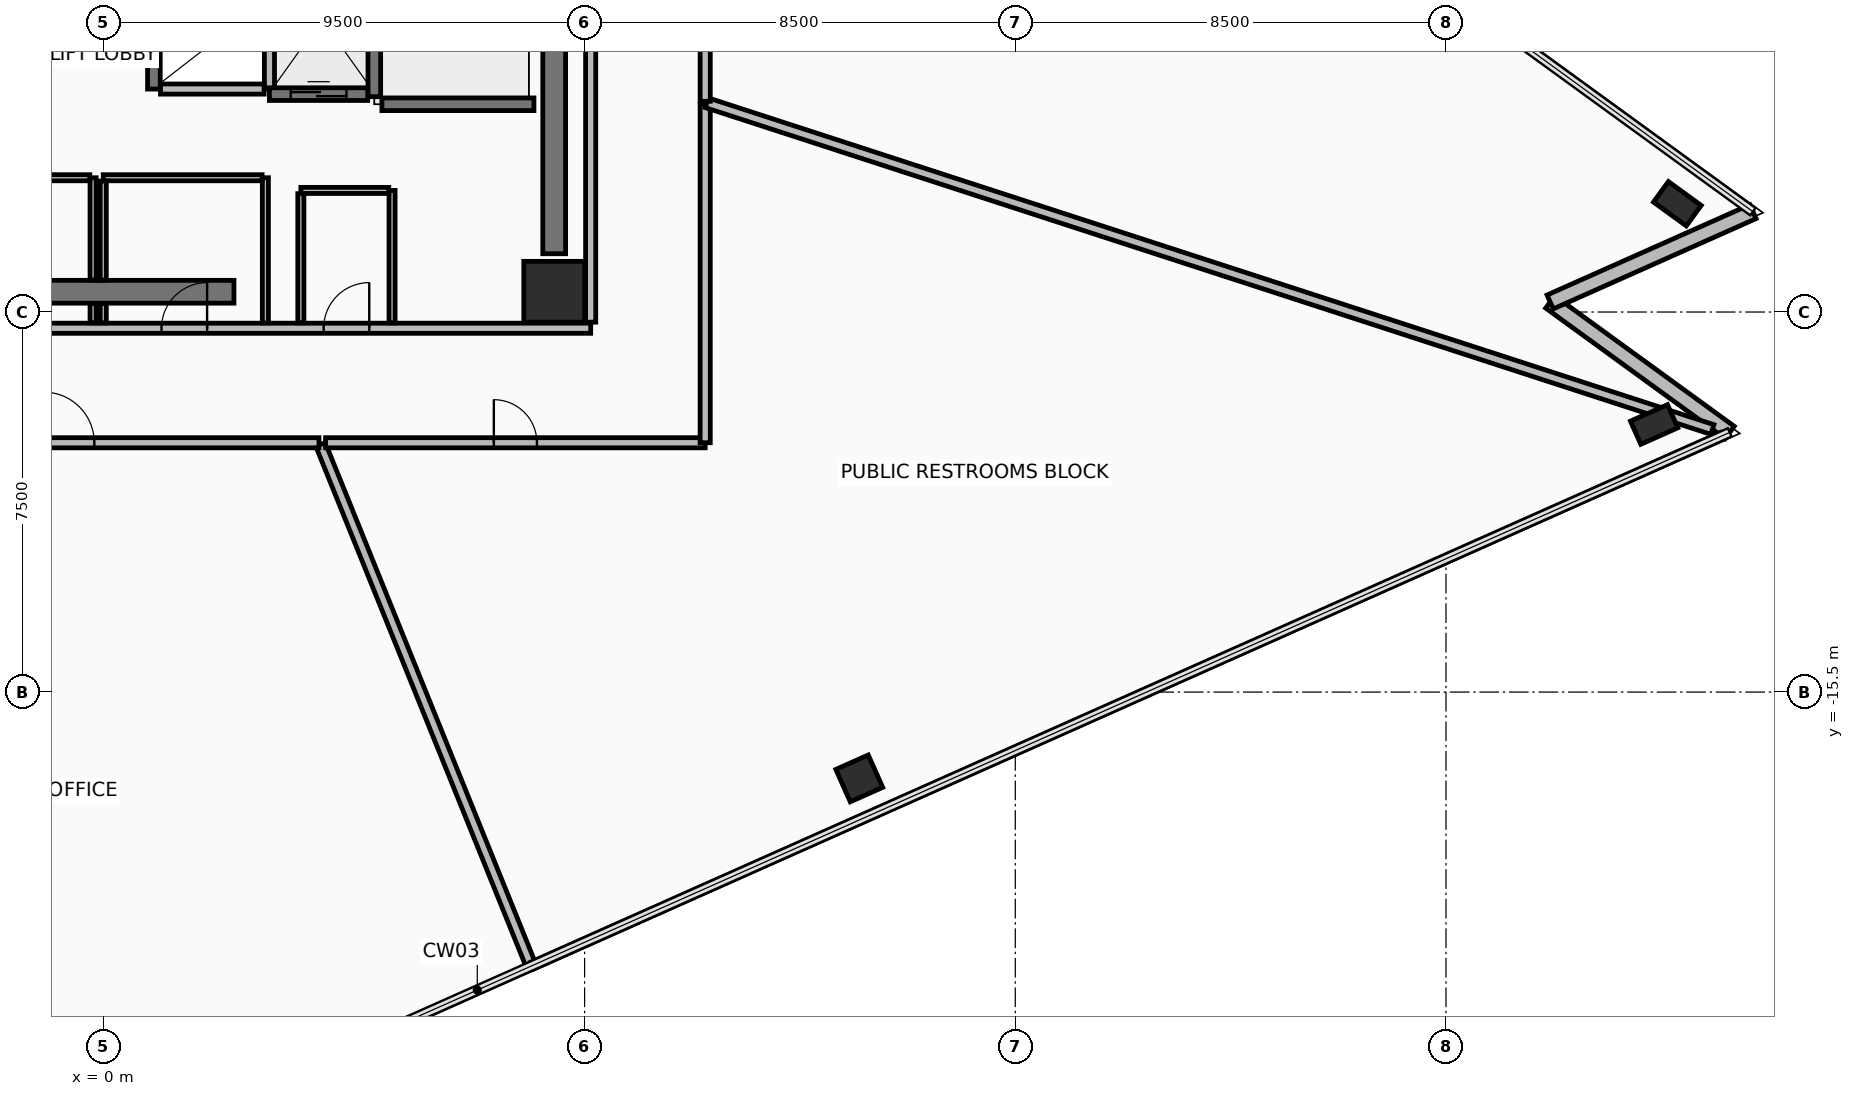
"""IFC4 building model, lengths in metres.
Left out: names, types, materials, properties, quantities, classifications, styles, units other than length and angle.
Written with IfcOpenShell. Run it as: python <this file> out.ifc"""

import sys

from ifc_helpers import new_model, si_unit, direction, frame, frame_2d, origin, origin_2d, place, context, subcontext, project, spatial, rectangle, hollow_rectangle, extrude, element, fill, save


model = new_model("IFC4")
c1 = context("Model", 3, precision=1e-05, world=origin(), true_north=direction((0.0, 1.0)))
c2 = subcontext(c1, "Body", "Model", "MODEL_VIEW")
j1 = project(units=[si_unit("LENGTHUNIT", "METRE"), si_unit("PLANEANGLEUNIT", "RADIAN")], contexts=[c1])
p1 = place(None, origin())
s1 = spatial("IfcSite", under=j1, at=p1, CompositionType="ELEMENT")
p2 = place(p1, origin())
s2 = spatial("IfcBuilding", under=s1, at=p2, CompositionType="ELEMENT")
p3 = place(p2, frame((0.0, 0.0, 112.45)))
s3 = spatial("IfcBuildingStorey", under=s2, at=p3, CompositionType="ELEMENT", Elevation=112.45)
p4 = place(p3, frame((8.9, -7.6, 0.0), z_axis=(0.0, 0.0, 1.0), x_axis=(1.0, 0.0, 0.0)))
e1 = element("IfcColumn", 1, at=p4, inside=s3, PredefinedType="COLUMN", context=c2, shape_type="SweptSolid", body=[
    extrude(rectangle(XDim=1.2, YDim=1.2, at=origin_2d()), origin(), (0.0, 0.0, 1.0), 3.6),
])
p5 = place(p3, frame((14.921, -17.204, 0.0), z_axis=(0.0, 0.0, 1.0), x_axis=(0.913545457643, 0.406736643076, 0.0)))
e2 = element("IfcColumn", 2, at=p5, inside=s3, PredefinedType="COLUMN", context=c2, shape_type="SweptSolid", body=[
    extrude(hollow_rectangle(XDim=0.7, YDim=0.7, WallThickness=0.04, at=origin_2d()), origin(), (0.0, 0.0, 1.0), 3.6),
])
for number, where, z_axis, x_axis in (
    (3, (30.608, -10.219, 0.0), (0.0, 0.0, 1.0), (0.914, 0.407, 0.0)),
    (4, (31.066, -5.863, 0.0), (0.0, 0.0, 1.0), (-0.809, 0.588, 0.0)),
):
    element("IfcColumn", number, at=place(p3, frame(where, z_axis=z_axis, x_axis=x_axis)), inside=s3, PredefinedType="COLUMN", context=c2, shape_type="SweptSolid", body=[
        extrude(hollow_rectangle(XDim=0.5, YDim=0.8, WallThickness=0.04, at=origin_2d()), origin(), (0.0, 0.0, 1.0), 3.6),
    ])
for number, where, z_axis, x_axis in (
    (5, (32.1, -10.376, 0.0), (0.0, 0.0, 1.0), (-0.809, 0.588, 0.0)),
    (6, (28.556, -7.802, 0.0), (0.0, 0.0, 1.0), (0.914, 0.407, 0.0)),
):
    element("IfcWall", number, at=place(p3, frame(where, z_axis=z_axis, x_axis=x_axis)), inside=s3, PredefinedType="STANDARD", context=c2, shape_type="SweptSolid", body=[
        extrude(rectangle(XDim=4.38, YDim=0.3, at=frame_2d((2.19, 0.0))), origin(), (0.0, 0.0, 1.0), 2.705),
    ])
p6 = place(p3, frame((-2.8, -7.6, 0.0), z_axis=(0.0, 0.0, 1.0), x_axis=(1.0, 0.0, 0.0)))
e7 = element("IfcWall", 7, at=p6, inside=s3, PredefinedType="SHEAR", context=c2, shape_type="SweptSolid", body=[
    extrude(rectangle(XDim=5.38, YDim=0.45, at=frame_2d((2.69, 0.0))), origin(), (0.0, 0.0, 1.0), 3.41),
])
p7 = place(p3, frame((8.9, -6.85, 0.0), z_axis=(0.0, 0.0, 1.0), x_axis=(0.0, 1.0, 0.0)))
e8 = element("IfcWall", 8, at=p7, inside=s3, PredefinedType="SHEAR", context=c2, shape_type="SweptSolid", body=[
    extrude(rectangle(XDim=10.7, YDim=0.45, at=frame_2d((5.35, 0.0))), origin(), (0.0, 0.0, 1.0), 3.41),
])
p8 = place(p3, frame((-9.62, -8.32, 0.0), z_axis=(0.0, 0.0, 1.0), x_axis=(1.0, 0.0, 0.0)))
e9 = element("IfcWall", 9, at=p8, inside=s3, PredefinedType="PARTITIONING", context=c2, shape_type="SweptSolid", body=[
    extrude(rectangle(XDim=19.24, YDim=0.2, at=frame_2d((9.62, 0.0))), origin(), (0.0, 0.0, 1.0), 2.855),
])
p9 = place(p8, frame((7.37, 0.0, 0.0)))
e10 = element("IfcOpeningElement", 10, at=p9, cuts=e9, PredefinedType="OPENING", context=c2, shape_type="SweptSolid", body=[
    extrude(rectangle(XDim=0.9, YDim=2.1, at=frame_2d((0.45, 1.05))), frame((0.0, 0.11, 0.0), z_axis=(0.0, -1.0, 0.0), x_axis=(1.0, 0.0, 0.0)), (0.0, 0.0, 1.0), 0.22),
])
p10 = place(p8, frame((10.77, 0.0, 0.0)))
e11 = element("IfcOpeningElement", 11, at=p10, cuts=e9, PredefinedType="OPENING", context=c2, shape_type="SweptSolid", body=[
    extrude(rectangle(XDim=0.9, YDim=2.1, at=frame_2d((0.45, 1.05))), frame((0.0, 0.11, 0.0), z_axis=(0.0, -1.0, 0.0), x_axis=(1.0, 0.0, 0.0)), (0.0, 0.0, 1.0), 0.22),
])
p11 = place(p8, frame((13.97, 0.0, 0.0)))
e12 = element("IfcOpeningElement", 12, at=p11, cuts=e9, PredefinedType="OPENING", context=c2, shape_type="SweptSolid", body=[
    extrude(rectangle(XDim=0.9, YDim=2.1, at=frame_2d((0.45, 1.05))), frame((0.0, 0.11, 0.0), z_axis=(0.0, -1.0, 0.0), x_axis=(1.0, 0.0, 0.0)), (0.0, 0.0, 1.0), 0.22),
])
p12 = place(p3, frame((9.62, -8.2, 0.0), z_axis=(0.0, 0.0, 1.0), x_axis=(0.0, 1.0, 0.0)))
e13 = element("IfcWall", 13, at=p12, inside=s3, PredefinedType="PARTITIONING", context=c2, shape_type="SweptSolid", body=[
    extrude(rectangle(XDim=16.4, YDim=0.2, at=frame_2d((8.2, 0.0))), origin(), (0.0, 0.0, 1.0), 2.855),
])
p13 = place(p12, frame((12.65, 0.0, 0.0)))
e14 = element("IfcOpeningElement", 14, at=p13, cuts=e13, PredefinedType="OPENING", context=c2, shape_type="SweptSolid", body=[
    extrude(rectangle(XDim=1.1, YDim=2.15, at=frame_2d((0.55, 1.075))), frame((0.0, 0.11, 0.0), z_axis=(0.0, -1.0, 0.0), x_axis=(1.0, 0.0, 0.0)), (0.0, 0.0, 1.0), 0.22),
])
p14 = place(p3, frame((5.35, -3.75, 0.0), z_axis=(0.0, 0.0, 1.0), x_axis=(0.0, 1.0, 0.0)))
e15 = element("IfcWall", 15, at=p14, inside=s3, PredefinedType="SHEAR", context=c2, shape_type="SweptSolid", body=[
    extrude(rectangle(XDim=7.3, YDim=0.25, at=frame_2d((3.65, 0.0))), origin(), (0.0, 0.0, 1.0), 3.41),
])
p15 = place(p3, frame((5.5, -3.9, 0.0), z_axis=(0.0, 0.0, 1.0), x_axis=(1.0, 0.0, 0.0)))
e16 = element("IfcWall", 16, at=p15, inside=s3, PredefinedType="SHEAR", context=c2, shape_type="SweptSolid", body=[
    extrude(rectangle(XDim=3.0, YDim=0.25, at=frame_2d((1.5, 0.0))), origin(), (0.0, 0.0, 1.0), 3.41),
])
p16 = place(p3, frame((1.0, -3.6, 0.0), z_axis=(0.0, 0.0, 1.0), x_axis=(0.0, 1.0, 0.0)))
e17 = element("IfcWall", 17, at=p16, inside=s3, PredefinedType="SHEAR", context=c2, shape_type="SweptSolid", body=[
    extrude(rectangle(XDim=1.8, YDim=0.25, at=frame_2d((0.9, 0.0))), origin(), (0.0, 0.0, 1.0), 3.41),
])
p17 = place(p3, frame((3.28, -3.6, 0.0), z_axis=(0.0, 0.0, 1.0), x_axis=(0.0, 1.0, 0.0)))
e18 = element("IfcWall", 18, at=p17, inside=s3, PredefinedType="PARTITIONING", context=c2, shape_type="SweptSolid", body=[
    extrude(rectangle(XDim=1.8, YDim=0.2, at=frame_2d((0.9, 0.0))), origin(), (0.0, 0.0, 1.0), 3.41),
])
p18 = place(p3, frame((1.13, -3.6, 0.0), z_axis=(0.0, 0.0, 1.0), x_axis=(1.0, 0.0, 0.0)))
e19 = element("IfcWall", 19, at=p18, inside=s3, PredefinedType="PARTITIONING", context=c2, shape_type="SweptSolid", body=[
    extrude(rectangle(XDim=2.045, YDim=0.2, at=frame_2d((1.022, 0.0))), origin(), (0.0, 0.0, 1.0), 3.41),
])
p19 = place(p3, frame((3.28, -3.7, 0.0), z_axis=(0.0, 0.0, 1.0), x_axis=(1.0, 0.0, 0.0)))
e20 = element("IfcWall", 20, at=p19, inside=s3, PredefinedType="SHEAR", context=c2, shape_type="SweptSolid", body=[
    extrude(rectangle(XDim=1.94, YDim=0.25, at=frame_2d((0.97, 0.0))), origin(), (0.0, 0.0, 1.0), 3.41),
])
p20 = place(p19, frame((0.42, 0.0, 0.0)))
e21 = element("IfcOpeningElement", 21, at=p20, cuts=e20, PredefinedType="OPENING", context=c2, shape_type="SweptSolid", body=[
    extrude(rectangle(XDim=1.1, YDim=2.2, at=frame_2d((0.55, 1.1))), frame((0.0, 0.135, 0.0), z_axis=(0.0, -1.0, 0.0), x_axis=(1.0, 0.0, 0.0)), (0.0, 0.0, 1.0), 0.27),
])
p21 = place(p3, frame((-0.2, -8.215, 0.0), z_axis=(0.0, 0.0, 1.0), x_axis=(0.0, 1.0, 0.0)))
e22 = element("IfcWall", 22, at=p21, inside=s3, PredefinedType="PARTITIONING", context=c2, shape_type="SweptSolid", body=[
    extrude(rectangle(XDim=0.385, YDim=0.12, at=frame_2d((0.192, 0.0))), origin(), (0.0, 0.0, 1.0), 2.605),
])
p22 = place(p3, frame((-0.2, -7.37, 0.0), z_axis=(0.0, 0.0, 1.0), x_axis=(0.0, 1.0, 0.0)))
e23 = element("IfcWall", 23, at=p22, inside=s3, PredefinedType="PARTITIONING", context=c2, shape_type="SweptSolid", body=[
    extrude(rectangle(XDim=2.02, YDim=0.12, at=frame_2d((1.01, 0.0))), origin(), (0.0, 0.0, 1.0), 2.605),
])
p23 = place(p3, frame((-0.265, -5.35, 0.0), z_axis=(0.0, 0.0, 1.0), x_axis=(-1.0, 0.0, 0.0)))
e24 = element("IfcWall", 24, at=p23, inside=s3, PredefinedType="PARTITIONING", context=c2, shape_type="SweptSolid", body=[
    extrude(rectangle(XDim=3.135, YDim=0.12, at=frame_2d((1.567, 0.0))), origin(), (0.0, 0.0, 1.0), 2.605),
])
p24 = place(p3, frame((3.2, -8.215, 0.0), z_axis=(0.0, 0.0, 1.0), x_axis=(0.0, 1.0, 0.0)))
e25 = element("IfcWall", 25, at=p24, inside=s3, PredefinedType="PARTITIONING", context=c2, shape_type="SweptSolid", body=[
    extrude(rectangle(XDim=2.865, YDim=0.12, at=frame_2d((1.433, 0.0))), origin(), (0.0, 0.0, 1.0), 2.605),
])
p25 = place(p3, frame((3.135, -5.35, 0.0), z_axis=(0.0, 0.0, 1.0), x_axis=(-1.0, 0.0, 0.0)))
e26 = element("IfcWall", 26, at=p25, inside=s3, PredefinedType="PARTITIONING", context=c2, shape_type="SweptSolid", body=[
    extrude(rectangle(XDim=3.135, YDim=0.12, at=frame_2d((1.567, 0.0))), origin(), (0.0, 0.0, 1.0), 3.41),
])
p26 = place(p3, frame((0.0, -5.415, 0.0), z_axis=(0.0, 0.0, 1.0), x_axis=(0.0, -1.0, 0.0)))
e27 = element("IfcWall", 27, at=p26, inside=s3, PredefinedType="PARTITIONING", context=c2, shape_type="SweptSolid", body=[
    extrude(rectangle(XDim=1.955, YDim=0.12, at=frame_2d((0.978, 0.0))), origin(), (0.0, 0.0, 1.0), 2.605),
])
p27 = place(p3, frame((0.0, -7.83, 0.0), z_axis=(0.0, 0.0, 1.0), x_axis=(0.0, -1.0, 0.0)))
e28 = element("IfcWall", 28, at=p27, inside=s3, PredefinedType="PARTITIONING", context=c2, shape_type="SweptSolid", body=[
    extrude(rectangle(XDim=0.385, YDim=0.12, at=frame_2d((0.192, 0.0))), origin(), (0.0, 0.0, 1.0), 2.605),
])
p28 = place(p3, frame((5.7, -8.215, 0.0), z_axis=(0.0, 0.0, 1.0), x_axis=(0.0, 1.0, 0.0)))
e29 = element("IfcWall", 29, at=p28, inside=s3, PredefinedType="PARTITIONING", context=c2, shape_type="SweptSolid", body=[
    extrude(rectangle(XDim=2.615, YDim=0.12, at=frame_2d((1.308, 0.0))), origin(), (0.0, 0.0, 1.0), 2.605),
])
p29 = place(p3, frame((5.635, -5.6, 0.0), z_axis=(0.0, 0.0, 1.0), x_axis=(-1.0, 0.0, 0.0)))
e30 = element("IfcWall", 30, at=p29, inside=s3, PredefinedType="PARTITIONING", context=c2, shape_type="SweptSolid", body=[
    extrude(rectangle(XDim=1.735, YDim=0.12, at=frame_2d((0.868, 0.0))), origin(), (0.0, 0.0, 1.0), 3.41),
])
p30 = place(p3, frame((3.9, -5.665, 0.0), z_axis=(0.0, 0.0, 1.0), x_axis=(0.0, -1.0, 0.0)))
e31 = element("IfcWall", 31, at=p30, inside=s3, PredefinedType="PARTITIONING", context=c2, shape_type="SweptSolid", body=[
    extrude(rectangle(XDim=2.55, YDim=0.12, at=frame_2d((1.275, 0.0))), origin(), (0.0, 0.0, 1.0), 2.605),
])
p31 = place(p3, frame((8.437, -20.883, 0.0), z_axis=(0.0, 0.0, 1.0), x_axis=(-0.374607748829, 0.927183387749, 0.0)))
e32 = element("IfcWall", 32, at=p31, inside=s3, PredefinedType="PARTITIONING", context=c2, shape_type="SweptSolid", body=[
    extrude(rectangle(XDim=11.075, YDim=0.2, at=frame_2d((5.537, 0.0))), origin(), (0.0, 0.0, 1.0), 2.705),
])
p32 = place(p3, frame((4.388, -10.58, 0.0), z_axis=(0.0, 0.0, 1.0), x_axis=(1.0, 0.0, 0.0)))
e33 = element("IfcWall", 33, at=p32, inside=s3, PredefinedType="PARTITIONING", context=c2, shape_type="SweptSolid", body=[
    extrude(rectangle(XDim=7.492, YDim=0.2, at=frame_2d((3.746, 0.0))), origin(), (0.0, 0.0, 1.0), 2.855),
])
p33 = place(p32, frame((3.321, 0.0, 0.0)))
e34 = element("IfcOpeningElement", 34, at=p33, cuts=e33, PredefinedType="OPENING", context=c2, shape_type="SweptSolid", body=[
    extrude(rectangle(XDim=0.85, YDim=2.1, at=frame_2d((0.425, 1.05))), frame((0.0, 0.11, 0.0), z_axis=(0.0, -1.0, 0.0), x_axis=(1.0, 0.0, 0.0)), (0.0, 0.0, 1.0), 0.22),
])
p34 = place(p3, frame((11.88, -10.579, 0.0), z_axis=(0.0, 0.0, 1.0), x_axis=(0.0, 1.0, 0.0)))
e35 = element("IfcWall", 35, at=p34, inside=s3, PredefinedType="PARTITIONING", context=c2, shape_type="SweptSolid", body=[
    extrude(rectangle(XDim=6.685, YDim=0.2, at=frame_2d((3.342, 0.0))), origin(), (0.0, 0.0, 1.0), 2.855),
])
p35 = place(p3, frame((11.913, -3.871, 0.0), z_axis=(0.0, 0.0, 1.0), x_axis=(0.951054616976, -0.309022839818, 0.0)))
e36 = element("IfcWall", 36, at=p35, inside=s3, PredefinedType="PARTITIONING", context=c2, shape_type="SweptSolid", body=[
    extrude(rectangle(XDim=20.866, YDim=0.2, at=frame_2d((10.433, 0.0))), origin(), (0.0, 0.0, 1.0), 2.705),
])
p36 = place(p3, frame((31.936, -10.449, 0.0), z_axis=(0.0, 0.0, 1.0), x_axis=(-0.913546005366, -0.406735412866, 0.0)))
e37 = element("IfcWall", 37, at=p36, inside=s3, PredefinedType="PARTITIONING", context=c2, shape_type="SweptSolid", body=[
    extrude(rectangle(XDim=25.686, YDim=0.15, at=frame_2d((12.843, 0.0))), origin(), (0.0, 0.0, 1.0), 3.41),
])
p37 = place(p3, frame((-5.611, -10.58, 0.0), z_axis=(0.0, 0.0, 1.0), x_axis=(1.0, 0.0, 0.0)))
e38 = element("IfcWall", 38, at=p37, inside=s3, PredefinedType="PARTITIONING", context=c2, shape_type="SweptSolid", body=[
    extrude(rectangle(XDim=9.868, YDim=0.2, at=frame_2d((4.934, 0.0))), origin(), (0.0, 0.0, 1.0), 2.855),
])
p38 = place(p37, frame((4.434, 0.0, 0.0)))
e39 = element("IfcOpeningElement", 39, at=p38, cuts=e38, PredefinedType="OPENING", context=c2, shape_type="SweptSolid", body=[
    extrude(rectangle(XDim=1.0, YDim=2.15, at=frame_2d((0.5, 1.075))), frame((0.0, 0.11, 0.0), z_axis=(0.0, -1.0, 0.0), x_axis=(1.0, 0.0, 0.0)), (0.0, 0.0, 1.0), 0.22),
])
p39 = place(p3, frame((11.88, -3.842, 0.0), z_axis=(0.0, 0.0, 1.0), x_axis=(0.0, 1.0, 0.0)))
e40 = element("IfcWall", 40, at=p39, inside=s3, PredefinedType="PARTITIONING", context=c2, shape_type="SweptSolid", body=[
    extrude(rectangle(XDim=12.845, YDim=0.2, at=frame_2d((6.423, 0.0))), origin(), (0.0, 0.0, 1.0), 2.705),
])
p40 = place(p39, frame((5.973, 0.0, 0.0)))
e41 = element("IfcOpeningElement", 41, at=p40, cuts=e40, PredefinedType="OPENING", context=c2, shape_type="SweptSolid", body=[
    extrude(rectangle(XDim=0.9, YDim=2.1, at=frame_2d((0.45, 1.05))), frame((0.0, 0.11, 0.0), z_axis=(0.0, -1.0, 0.0), x_axis=(1.0, 0.0, 0.0)), (0.0, 0.0, 1.0), 0.22),
])
p41 = place(p20, origin())
e42 = element("IfcDoor", 42, at=p41, inside=s3, OperationType="SLIDING_TO_LEFT", PredefinedType="DOOR", context=c2, shape_type="SweptSolid", body=[
    extrude(rectangle(XDim=1.1, YDim=2.2, at=frame_2d((0.55, 1.1))), frame((0.0, 0.025, 0.0), z_axis=(0.0, -1.0, 0.0), x_axis=(1.0, 0.0, 0.0)), (0.0, 0.0, 1.0), 0.05),
])
fill(e21, e42)
p42 = place(p10, frame((0.9, 0.0, 0.0), z_axis=(0.0, 0.0, 1.0), x_axis=(-1.0, 0.0, 0.0)))
e43 = element("IfcDoor", 43, at=p42, inside=s3, OperationType="SINGLE_SWING_LEFT", PredefinedType="DOOR", context=c2, shape_type="SweptSolid", body=[
    extrude(rectangle(XDim=0.9, YDim=2.1, at=frame_2d((0.45, 1.05))), frame((0.0, 0.025, 0.0), z_axis=(0.0, -1.0, 0.0), x_axis=(1.0, 0.0, 0.0)), (0.0, 0.0, 1.0), 0.05),
])
fill(e11, e43)
p43 = place(p11, frame((0.9, 0.0, 0.0), z_axis=(0.0, 0.0, 1.0), x_axis=(-1.0, 0.0, 0.0)))
e44 = element("IfcDoor", 44, at=p43, inside=s3, OperationType="SINGLE_SWING_LEFT", PredefinedType="DOOR", context=c2, shape_type="SweptSolid", body=[
    extrude(rectangle(XDim=0.9, YDim=2.1, at=frame_2d((0.45, 1.05))), frame((0.0, 0.025, 0.0), z_axis=(0.0, -1.0, 0.0), x_axis=(1.0, 0.0, 0.0)), (0.0, 0.0, 1.0), 0.05),
])
fill(e12, e44)
p44 = place(p33, origin())
e45 = element("IfcDoor", 45, at=p44, inside=s3, OperationType="SINGLE_SWING_RIGHT", PredefinedType="DOOR", context=c2, shape_type="SweptSolid", body=[
    extrude(rectangle(XDim=0.85, YDim=2.1, at=frame_2d((0.425, 1.05))), frame((0.0, 0.025, 0.0), z_axis=(0.0, -1.0, 0.0), x_axis=(1.0, 0.0, 0.0)), (0.0, 0.0, 1.0), 0.05),
])
fill(e34, e45)
p45 = place(p38, origin())
e46 = element("IfcDoor", 46, at=p45, inside=s3, OperationType="SINGLE_SWING_RIGHT", PredefinedType="DOOR", context=c2, shape_type="SweptSolid", body=[
    extrude(rectangle(XDim=1.0, YDim=2.15, at=frame_2d((0.5, 1.075))), frame((0.0, 0.025, 0.0), z_axis=(0.0, -1.0, 0.0), x_axis=(1.0, 0.0, 0.0)), (0.0, 0.0, 1.0), 0.05),
])
fill(e39, e46)
save(model, sys.argv[1])
